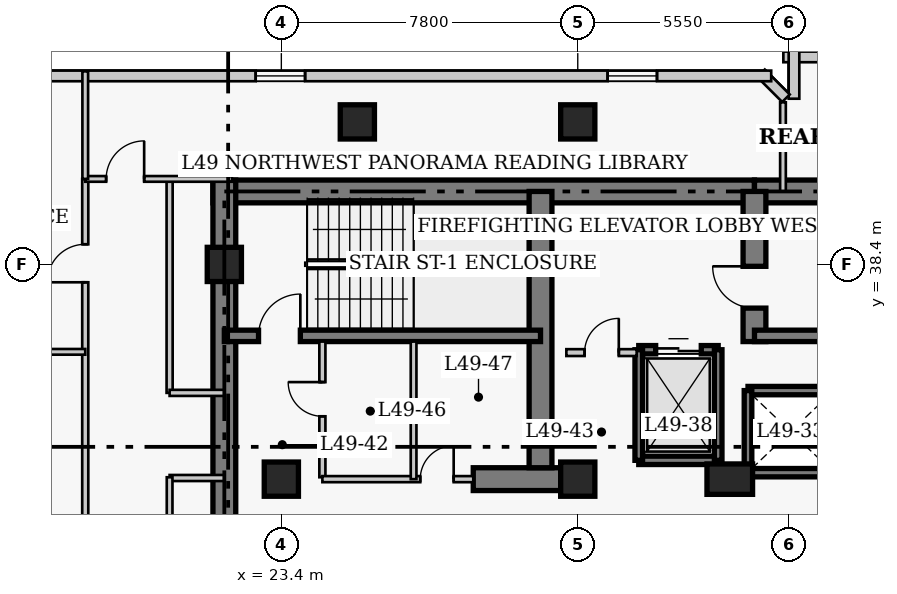
"""IFC4 building model, lengths in metres.
Left out: names, types, materials, properties, quantities, classifications, styles, units other than length and angle.
Written with IfcOpenShell. Run it as: python <this file> out.ifc"""

import sys

from ifc_helpers import new_model, si_unit, direction, frame, frame_2d, origin, origin_2d, place, context, subcontext, project, spatial, rectangle, extrude, element, fill, save


model = new_model("IFC4")
c1 = context("Model", 3, precision=1e-05, world=origin(), true_north=direction((0.0, 1.0)))
c2 = subcontext(c1, "Body", "Model", "MODEL_VIEW")
j1 = project(units=[si_unit("LENGTHUNIT", "METRE"), si_unit("PLANEANGLEUNIT", "RADIAN")], contexts=[c1])
p1 = place(None, origin())
s1 = spatial("IfcSite", under=j1, at=p1, CompositionType="ELEMENT")
p2 = place(p1, origin())
s2 = spatial("IfcBuilding", under=s1, at=p2, CompositionType="ELEMENT")
p3 = place(p2, frame((0.0, 0.0, 196.8)))
s3 = spatial("IfcBuildingStorey", under=s2, at=p3, CompositionType="ELEMENT", Elevation=196.8)
p4 = place(p3, frame((21.6, 40.32, 0.0), z_axis=(0.0, 0.0, 1.0), x_axis=(1.0, 0.0, 0.0)))
e1 = element("IfcWall", 1, at=p4, inside=s3, PredefinedType="SHEAR", context=c2, shape_type="SweptSolid", body=[
    extrude(rectangle(XDim=14.25, YDim=0.6, at=frame_2d((7.125, 0.0))), origin(), (0.0, 0.0, 1.0), 3.9),
])
p5 = place(p3, frame((35.85, 40.32, 0.0), z_axis=(0.0, 0.0, 1.0), x_axis=(1.0, 0.0, 0.0)))
e2 = element("IfcWall", 2, at=p5, inside=s3, PredefinedType="SHEAR", context=c2, shape_type="SweptSolid", body=[
    extrude(rectangle(XDim=12.6, YDim=0.6, at=frame_2d((6.3, 0.0))), origin(), (0.0, 0.0, 1.0), 3.9),
])
p6 = place(p3, frame((21.9, 27.05, 0.0), z_axis=(0.0, 0.0, 1.0), x_axis=(0.0, 1.0, 0.0)))
e3 = element("IfcWall", 3, at=p6, inside=s3, PredefinedType="SHEAR", context=c2, shape_type="SweptSolid", body=[
    extrude(rectangle(XDim=13.57, YDim=0.6, at=frame_2d((6.785, 0.0))), origin(), (0.0, 0.0, 1.0), 3.9),
])
p7 = place(p3, frame((28.45, 32.75, 0.0), z_axis=(0.0, 0.0, 1.0), x_axis=(1.0, 0.0, 0.0)))
e4 = element("IfcWall", 4, at=p7, inside=s3, PredefinedType="SHEAR", context=c2, shape_type="SweptSolid", body=[
    extrude(rectangle(XDim=2.4, YDim=0.6, at=frame_2d((1.2, 0.0))), origin(), (0.0, 0.0, 1.0), 3.9),
])
p8 = place(p3, frame((30.22, 33.05, 0.0), z_axis=(0.0, 0.0, 1.0), x_axis=(0.0, 1.0, 0.0)))
e5 = element("IfcWall", 5, at=p8, inside=s3, PredefinedType="SHEAR", context=c2, shape_type="SweptSolid", body=[
    extrude(rectangle(XDim=7.27, YDim=0.6, at=frame_2d((3.635, 0.0))), origin(), (0.0, 0.0, 1.0), 3.9),
])
p9 = place(p3, frame((35.85, 36.37, 0.0), z_axis=(0.0, 0.0, 1.0), x_axis=(0.0, 1.0, 0.0)))
e6 = element("IfcWall", 6, at=p9, inside=s3, PredefinedType="SHEAR", context=c2, shape_type="SweptSolid", body=[
    extrude(rectangle(XDim=3.95, YDim=0.6, at=frame_2d((1.975, 0.0))), origin(), (0.0, 0.0, 1.0), 3.9),
])
p10 = place(p9, frame((0.88, 0.0, 0.0)))
e7 = element("IfcOpeningElement", 7, at=p10, cuts=e6, PredefinedType="OPENING", context=c2, shape_type="SweptSolid", body=[
    extrude(rectangle(XDim=1.1, YDim=2.15, at=frame_2d((0.55, 1.075))), frame((0.0, 0.31, 0.0), z_axis=(0.0, -1.0, 0.0), x_axis=(1.0, 0.0, 0.0)), (0.0, 0.0, 1.0), 0.62),
])
p11 = place(p3, frame((21.9, 36.52, 0.0), z_axis=(0.0, 0.0, 1.0), x_axis=(1.0, 0.0, 0.0)))
e8 = element("IfcWall", 8, at=p11, inside=s3, PredefinedType="SHEAR", context=c2, shape_type="SweptSolid", body=[
    extrude(rectangle(XDim=8.32, YDim=0.3, at=frame_2d((4.16, 0.0))), origin(), (0.0, 0.0, 1.0), 3.9),
])
p12 = place(p11, frame((0.9, 0.0, 0.0)))
e9 = element("IfcOpeningElement", 9, at=p12, cuts=e8, PredefinedType="OPENING", context=c2, shape_type="SweptSolid", body=[
    extrude(rectangle(XDim=1.1, YDim=2.15, at=frame_2d((0.55, 1.075))), frame((0.0, 0.16, 0.0), z_axis=(0.0, -1.0, 0.0), x_axis=(1.0, 0.0, 0.0)), (0.0, 0.0, 1.0), 0.32),
])
p13 = place(p3, frame((35.85, 36.52, 0.0), z_axis=(0.0, 0.0, 1.0), x_axis=(1.0, 0.0, 0.0)))
e10 = element("IfcWall", 10, at=p13, inside=s3, PredefinedType="SHEAR", context=c2, shape_type="SweptSolid", body=[
    extrude(rectangle(XDim=8.33, YDim=0.3, at=frame_2d((4.165, 0.0))), origin(), (0.0, 0.0, 1.0), 3.9),
])
for number, where, z_axis, x_axis in (
    (11, (21.9, 38.4, 0.0), (0.0, 0.0, 1.0), (1.0, 0.0, 0.0)),
    (12, (23.4, 32.75, 0.0), (0.0, 0.0, 1.0), (1.0, 0.0, 0.0)),
    (13, (31.2, 32.75, 0.0), (0.0, 0.0, 1.0), (1.0, 0.0, 0.0)),
):
    element("IfcColumn", number, at=place(p3, frame(where, z_axis=z_axis, x_axis=x_axis)), inside=s3, PredefinedType="COLUMN", context=c2, shape_type="SweptSolid", body=[
        extrude(rectangle(XDim=0.9, YDim=0.9, at=origin_2d()), origin(), (0.0, 0.0, 1.0), 3.9),
    ])
p14 = place(p3, frame((35.2, 32.75, 0.0), z_axis=(0.0, 0.0, 1.0), x_axis=(1.0, 0.0, 0.0)))
e14 = element("IfcColumn", 14, at=p14, inside=s3, PredefinedType="COLUMN", context=c2, shape_type="SweptSolid", body=[
    extrude(rectangle(XDim=1.2, YDim=0.8, at=origin_2d()), origin(), (0.0, 0.0, 1.0), 3.9),
])
for number, where, z_axis, x_axis in (
    (15, (25.4, 42.15, 0.0), (0.0, 0.0, 1.0), (1.0, 0.0, 0.0)),
    (16, (31.2, 42.15, 0.0), (0.0, 0.0, 1.0), (1.0, 0.0, 0.0)),
):
    element("IfcColumn", number, at=place(p3, frame(where, z_axis=z_axis, x_axis=x_axis)), inside=s3, PredefinedType="COLUMN", context=c2, shape_type="SweptSolid", body=[
        extrude(rectangle(XDim=0.9, YDim=0.9, at=origin_2d()), origin(), (0.0, 0.0, 1.0), 3.9),
    ])
p15 = place(p3, frame((41.39, 43.86, 0.0), z_axis=(0.0, 0.0, 1.0), x_axis=(-1.0, 0.0, 0.0)))
e17 = element("IfcWall", 17, at=p15, inside=s3, PredefinedType="SOLIDWALL", context=c2, shape_type="SweptSolid", body=[
    extrude(rectangle(XDim=4.78, YDim=0.28, at=frame_2d((2.39, 0.0))), origin(), (0.0, 0.0, 1.0), 3.65),
])
p16 = place(p15, frame((1.74, 0.0, 0.85)))
e18 = element("IfcOpeningElement", 18, at=p16, cuts=e17, PredefinedType="OPENING", context=c2, shape_type="SweptSolid", body=[
    extrude(rectangle(XDim=1.3, YDim=1.7, at=frame_2d((0.65, 0.85))), frame((0.0, 0.15, 0.0), z_axis=(0.0, -1.0, 0.0), x_axis=(1.0, 0.0, 0.0)), (0.0, 0.0, 1.0), 0.3),
])
p17 = place(p3, frame((36.89, 44.14, 0.0), z_axis=(0.0, 0.0, 1.0), x_axis=(0.0, -1.0, 0.0)))
e19 = element("IfcWall", 19, at=p17, inside=s3, PredefinedType="SOLIDWALL", context=c2, shape_type="SweptSolid", body=[
    extrude(rectangle(XDim=1.38, YDim=0.28, at=frame_2d((0.69, 0.0))), origin(), (0.0, 0.0, 1.0), 3.65),
])
p18 = place(p3, frame((36.679, 42.773, 0.0), z_axis=(0.0, 0.0, 1.0), x_axis=(-0.707106781187, 0.707106781187, 0.0)))
e20 = element("IfcWall", 20, at=p18, inside=s3, PredefinedType="SOLIDWALL", context=c2, shape_type="SweptSolid", body=[
    extrude(rectangle(XDim=0.928, YDim=0.28, at=frame_2d((0.464, 0.0))), origin(), (0.0, 0.0, 1.0), 3.65),
])
p19 = place(p3, frame((36.29, 43.36, 0.0), z_axis=(0.0, 0.0, 1.0), x_axis=(-1.0, 0.0, 0.0)))
e21 = element("IfcWall", 21, at=p19, inside=s3, PredefinedType="SOLIDWALL", context=c2, shape_type="SweptSolid", body=[
    extrude(rectangle(XDim=25.83, YDim=0.28, at=frame_2d((12.915, 0.0))), origin(), (0.0, 0.0, 1.0), 3.65),
])
p20 = place(p19, frame((3.005, 0.0, 0.85)))
e22 = element("IfcOpeningElement", 22, at=p20, cuts=e21, PredefinedType="OPENING", context=c2, shape_type="SweptSolid", body=[
    extrude(rectangle(XDim=1.3, YDim=1.7, at=frame_2d((0.65, 0.85))), frame((0.0, 0.15, 0.0), z_axis=(0.0, -1.0, 0.0), x_axis=(1.0, 0.0, 0.0)), (0.0, 0.0, 1.0), 0.3),
])
p21 = place(p19, frame((12.265, 0.0, 0.85)))
e23 = element("IfcOpeningElement", 23, at=p21, cuts=e21, PredefinedType="OPENING", context=c2, shape_type="SweptSolid", body=[
    extrude(rectangle(XDim=1.3, YDim=1.7, at=frame_2d((0.65, 0.85))), frame((0.0, 0.15, 0.0), z_axis=(0.0, -1.0, 0.0), x_axis=(1.0, 0.0, 0.0)), (0.0, 0.0, 1.0), 0.3),
])
p22 = place(p19, frame((20.875, 0.0, 0.85)))
e24 = element("IfcOpeningElement", 24, at=p22, cuts=e21, PredefinedType="OPENING", context=c2, shape_type="SweptSolid", body=[
    extrude(rectangle(XDim=1.3, YDim=1.7, at=frame_2d((0.65, 0.85))), frame((0.0, 0.15, 0.0), z_axis=(0.0, -1.0, 0.0), x_axis=(1.0, 0.0, 0.0)), (0.0, 0.0, 1.0), 0.3),
])
for number, where, z_axis, x_axis in (
    (25, (35.68, 35.08, 0.0), (0.0, 0.0, 1.0), (1.0, 0.0, 0.0)),
    (26, (35.68, 32.92, 0.0), (0.0, 0.0, 1.0), (1.0, 0.0, 0.0)),
):
    element("IfcWall", number, at=place(p3, frame(where, z_axis=z_axis, x_axis=x_axis)), inside=s3, PredefinedType="SHEAR", context=c2, shape_type="SweptSolid", body=[
        extrude(rectangle(XDim=2.32, YDim=0.22, at=frame_2d((1.16, 0.0))), origin(), (0.0, 0.0, 1.0), 3.9),
    ])
p23 = place(p3, frame((35.68, 32.92, 0.0), z_axis=(0.0, 0.0, 1.0), x_axis=(0.0, 1.0, 0.0)))
e27 = element("IfcWall", 27, at=p23, inside=s3, PredefinedType="SHEAR", context=c2, shape_type="SweptSolid", body=[
    extrude(rectangle(XDim=2.16, YDim=0.2, at=frame_2d((1.08, 0.0))), origin(), (0.0, 0.0, 1.0), 3.9),
])
p24 = place(p3, frame((32.805, 36.155, 0.0), z_axis=(0.0, 0.0, 1.0), x_axis=(1.0, 0.0, 0.0)))
e28 = element("IfcWall", 28, at=p24, inside=s3, PredefinedType="SHEAR", context=c2, shape_type="SweptSolid", body=[
    extrude(rectangle(XDim=2.09, YDim=0.22, at=frame_2d((1.045, 0.0))), origin(), (0.0, 0.0, 1.0), 3.9),
])
p25 = place(p24, frame((0.445, 0.0, 0.0)))
e29 = element("IfcOpeningElement", 29, at=p25, cuts=e28, PredefinedType="OPENING", context=c2, shape_type="SweptSolid", body=[
    extrude(rectangle(XDim=1.2, YDim=2.15, at=frame_2d((0.6, 1.075))), frame((0.0, 0.12, 0.0), z_axis=(0.0, -1.0, 0.0), x_axis=(1.0, 0.0, 0.0)), (0.0, 0.0, 1.0), 0.24),
])
p26 = place(p3, frame((32.805, 33.245, 0.0), z_axis=(0.0, 0.0, 1.0), x_axis=(1.0, 0.0, 0.0)))
e30 = element("IfcWall", 30, at=p26, inside=s3, PredefinedType="SHEAR", context=c2, shape_type="SweptSolid", body=[
    extrude(rectangle(XDim=2.09, YDim=0.22, at=frame_2d((1.045, 0.0))), origin(), (0.0, 0.0, 1.0), 3.9),
])
for number, where, z_axis, x_axis in (
    (31, (32.805, 33.245, 0.0), (0.0, 0.0, 1.0), (0.0, 1.0, 0.0)),
    (32, (34.895, 33.245, 0.0), (0.0, 0.0, 1.0), (0.0, 1.0, 0.0)),
):
    element("IfcWall", number, at=place(p3, frame(where, z_axis=z_axis, x_axis=x_axis)), inside=s3, PredefinedType="SHEAR", context=c2, shape_type="SweptSolid", body=[
        extrude(rectangle(XDim=2.91, YDim=0.2, at=frame_2d((1.455, 0.0))), origin(), (0.0, 0.0, 1.0), 3.9),
    ])
p27 = place(p3, frame((30.9, 36.08, 0.0), z_axis=(0.0, 0.0, 1.0), x_axis=(1.0, 0.0, 0.0)))
e33 = element("IfcWall", 33, at=p27, inside=s3, PredefinedType="PARTITIONING", context=c2, shape_type="SweptSolid", body=[
    extrude(rectangle(XDim=1.85, YDim=0.18, at=frame_2d((0.925, 0.0))), origin(), (0.0, 0.0, 1.0), 3.65),
])
p28 = place(p27, frame((0.48, 0.0, 0.0)))
e34 = element("IfcOpeningElement", 34, at=p28, cuts=e33, PredefinedType="OPENING", context=c2, shape_type="SweptSolid", body=[
    extrude(rectangle(XDim=0.9, YDim=2.15, at=frame_2d((0.45, 1.075))), frame((0.0, 0.1, 0.0), z_axis=(0.0, -1.0, 0.0), x_axis=(1.0, 0.0, 0.0)), (0.0, 0.0, 1.0), 0.2),
])
p29 = place(p3, frame((24.48, 32.8, 0.0), z_axis=(0.0, 0.0, 1.0), x_axis=(0.0, 1.0, 0.0)))
e35 = element("IfcWall", 35, at=p29, inside=s3, PredefinedType="PARTITIONING", context=c2, shape_type="SweptSolid", body=[
    extrude(rectangle(XDim=3.57, YDim=0.16, at=frame_2d((1.785, 0.0))), origin(), (0.0, 0.0, 1.0), 3.65),
])
p30 = place(p29, frame((1.604, 0.0, 0.0)))
e36 = element("IfcOpeningElement", 36, at=p30, cuts=e35, PredefinedType="OPENING", context=c2, shape_type="SweptSolid", body=[
    extrude(rectangle(XDim=0.9, YDim=2.1, at=frame_2d((0.45, 1.05))), frame((0.0, 0.09, 0.0), z_axis=(0.0, -1.0, 0.0), x_axis=(1.0, 0.0, 0.0)), (0.0, 0.0, 1.0), 0.18),
])
p31 = place(p3, frame((24.48, 32.75, 0.0), z_axis=(0.0, 0.0, 1.0), x_axis=(1.0, 0.0, 0.0)))
e37 = element("IfcWall", 37, at=p31, inside=s3, PredefinedType="PARTITIONING", context=c2, shape_type="SweptSolid", body=[
    extrude(rectangle(XDim=3.97, YDim=0.16, at=frame_2d((1.985, 0.0))), origin(), (0.0, 0.0, 1.0), 3.65),
])
p32 = place(p31, frame((2.575, 0.0, 0.0)))
e38 = element("IfcOpeningElement", 38, at=p32, cuts=e37, PredefinedType="OPENING", context=c2, shape_type="SweptSolid", body=[
    extrude(rectangle(XDim=0.88, YDim=2.05, at=frame_2d((0.44, 1.025))), frame((0.0, 0.09, 0.0), z_axis=(0.0, -1.0, 0.0), x_axis=(1.0, 0.0, 0.0)), (0.0, 0.0, 1.0), 0.18),
])
p33 = place(p3, frame((26.88, 32.75, 0.0), z_axis=(0.0, 0.0, 1.0), x_axis=(0.0, 1.0, 0.0)))
e39 = element("IfcWall", 39, at=p33, inside=s3, PredefinedType="PARTITIONING", context=c2, shape_type="SweptSolid", body=[
    extrude(rectangle(XDim=3.62, YDim=0.15, at=frame_2d((1.81, 0.0))), origin(), (0.0, 0.0, 1.0), 3.65),
])
p34 = place(p3, frame((18.24, 7.55, 0.0), z_axis=(0.0, 0.0, 1.0), x_axis=(0.0, 1.0, 0.0)))
e40 = element("IfcWall", 40, at=p34, inside=s3, PredefinedType="PARTITIONING", context=c2, shape_type="SweptSolid", body=[
    extrude(rectangle(XDim=33.1, YDim=0.16, at=frame_2d((16.55, 0.0))), origin(), (0.0, 0.0, 1.0), 3.65),
])
p35 = place(p34, frame((1.35, 0.0, 0.0)))
e41 = element("IfcOpeningElement", 41, at=p35, cuts=e40, PredefinedType="OPENING", context=c2, shape_type="SweptSolid", body=[
    extrude(rectangle(XDim=0.95, YDim=2.1, at=frame_2d((0.475, 1.05))), frame((0.0, 0.09, 0.0), z_axis=(0.0, -1.0, 0.0), x_axis=(1.0, 0.0, 0.0)), (0.0, 0.0, 1.0), 0.18),
])
p36 = place(p34, frame((7.575, 0.0, 0.0)))
e42 = element("IfcOpeningElement", 42, at=p36, cuts=e40, PredefinedType="OPENING", context=c2, shape_type="SweptSolid", body=[
    extrude(rectangle(XDim=0.95, YDim=2.1, at=frame_2d((0.475, 1.05))), frame((0.0, 0.09, 0.0), z_axis=(0.0, -1.0, 0.0), x_axis=(1.0, 0.0, 0.0)), (0.0, 0.0, 1.0), 0.18),
])
p37 = place(p34, frame((20.025, 0.0, 0.0)))
e43 = element("IfcOpeningElement", 43, at=p37, cuts=e40, PredefinedType="OPENING", context=c2, shape_type="SweptSolid", body=[
    extrude(rectangle(XDim=0.95, YDim=2.1, at=frame_2d((0.475, 1.05))), frame((0.0, 0.09, 0.0), z_axis=(0.0, -1.0, 0.0), x_axis=(1.0, 0.0, 0.0)), (0.0, 0.0, 1.0), 0.18),
])
p38 = place(p34, frame((30.38, 0.0, 0.0)))
e44 = element("IfcOpeningElement", 44, at=p38, cuts=e40, PredefinedType="OPENING", context=c2, shape_type="SweptSolid", body=[
    extrude(rectangle(XDim=1.0, YDim=2.15, at=frame_2d((0.5, 1.075))), frame((0.0, 0.09, 0.0), z_axis=(0.0, -1.0, 0.0), x_axis=(1.0, 0.0, 0.0)), (0.0, 0.0, 1.0), 0.18),
])
p39 = place(p3, frame((20.46, 35.02, 0.0), z_axis=(0.0, 0.0, 1.0), x_axis=(0.0, 1.0, 0.0)))
e45 = element("IfcWall", 45, at=p39, inside=s3, PredefinedType="PARTITIONING", context=c2, shape_type="SweptSolid", body=[
    extrude(rectangle(XDim=5.63, YDim=0.16, at=frame_2d((2.815, 0.0))), origin(), (0.0, 0.0, 1.0), 3.65),
])
for number, where, z_axis, x_axis in (
    (46, (20.46, 35.02, 0.0), (0.0, 0.0, 1.0), (1.0, 0.0, 0.0)),
    (47, (20.46, 32.78, 0.0), (0.0, 0.0, 1.0), (1.0, 0.0, 0.0)),
):
    element("IfcWall", number, at=place(p3, frame(where, z_axis=z_axis, x_axis=x_axis)), inside=s3, PredefinedType="PARTITIONING", context=c2, shape_type="SweptSolid", body=[
        extrude(rectangle(XDim=1.44, YDim=0.16, at=frame_2d((0.72, 0.0))), origin(), (0.0, 0.0, 1.0), 3.65),
    ])
p40 = place(p3, frame((18.24, 40.65, 0.0), z_axis=(0.0, 0.0, 1.0), x_axis=(1.0, 0.0, 0.0)))
e48 = element("IfcWall", 48, at=p40, inside=s3, PredefinedType="PARTITIONING", context=c2, shape_type="SweptSolid", body=[
    extrude(rectangle(XDim=3.86, YDim=0.15, at=frame_2d((1.93, 0.0))), origin(), (0.0, 0.0, 1.0), 3.65),
])
p41 = place(p40, frame((0.55, 0.0, 0.0)))
e49 = element("IfcOpeningElement", 49, at=p41, cuts=e48, PredefinedType="OPENING", context=c2, shape_type="SweptSolid", body=[
    extrude(rectangle(XDim=1.0, YDim=2.15, at=frame_2d((0.5, 1.075))), frame((0.0, 0.085, 0.0), z_axis=(0.0, -1.0, 0.0), x_axis=(1.0, 0.0, 0.0)), (0.0, 0.0, 1.0), 0.17),
])
p42 = place(p3, frame((20.46, 17.26, 0.0), z_axis=(0.0, 0.0, 1.0), x_axis=(0.0, 1.0, 0.0)))
e50 = element("IfcWall", 50, at=p42, inside=s3, PredefinedType="PARTITIONING", context=c2, shape_type="SweptSolid", body=[
    extrude(rectangle(XDim=15.54, YDim=0.15, at=frame_2d((7.77, 0.0))), origin(), (0.0, 0.0, 1.0), 3.65),
])
p43 = place(p3, frame((18.24, 40.65, 0.0), z_axis=(0.0, 0.0, 1.0), x_axis=(0.0, 1.0, 0.0)))
e51 = element("IfcWall", 51, at=p43, inside=s3, PredefinedType="PARTITIONING", context=c2, shape_type="SweptSolid", body=[
    extrude(rectangle(XDim=2.83, YDim=0.15, at=frame_2d((1.415, 0.0))), origin(), (0.0, 0.0, 1.0), 3.65),
])
p44 = place(p3, frame((36.6, 40.32, 0.0), z_axis=(0.0, 0.0, 1.0), x_axis=(0.0, 1.0, 0.0)))
e52 = element("IfcWall", 52, at=p44, inside=s3, PredefinedType="PARTITIONING", context=c2, shape_type="SweptSolid", body=[
    extrude(rectangle(XDim=2.345, YDim=0.15, at=frame_2d((1.172, 0.0))), origin(), (0.0, 0.0, 1.0), 3.65),
])
p45 = place(p3, frame((14.45, 36.1, 0.0), z_axis=(0.0, 0.0, 1.0), x_axis=(1.0, 0.0, 0.0)))
e53 = element("IfcWall", 53, at=p45, inside=s3, PredefinedType="PARTITIONING", context=c2, shape_type="SweptSolid", body=[
    extrude(rectangle(XDim=3.79, YDim=0.15, at=frame_2d((1.895, 0.0))), origin(), (0.0, 0.0, 1.0), 3.65),
])
p46 = place(p20, origin())
e54 = element("IfcWindow", 54, at=p46, inside=s3, PartitioningType="SINGLE_PANEL", PredefinedType="WINDOW", context=c2, shape_type="SweptSolid", body=[
    extrude(rectangle(XDim=1.3, YDim=1.7, at=frame_2d((0.65, 0.85))), frame((0.0, 0.03, 0.0), z_axis=(0.0, -1.0, 0.0), x_axis=(1.0, 0.0, 0.0)), (0.0, 0.0, 1.0), 0.06),
])
fill(e22, e54)
p47 = place(p21, origin())
e55 = element("IfcWindow", 55, at=p47, inside=s3, PartitioningType="SINGLE_PANEL", PredefinedType="WINDOW", context=c2, shape_type="SweptSolid", body=[
    extrude(rectangle(XDim=1.3, YDim=1.7, at=frame_2d((0.65, 0.85))), frame((0.0, 0.03, 0.0), z_axis=(0.0, -1.0, 0.0), x_axis=(1.0, 0.0, 0.0)), (0.0, 0.0, 1.0), 0.06),
])
fill(e23, e55)
p48 = place(p25, origin())
e56 = element("IfcDoor", 56, at=p48, inside=s3, OperationType="DOUBLE_DOOR_SLIDING", PredefinedType="DOOR", context=c2, shape_type="SweptSolid", body=[
    extrude(rectangle(XDim=1.2, YDim=2.15, at=frame_2d((0.6, 1.075))), frame((0.0, 0.025, 0.0), z_axis=(0.0, -1.0, 0.0), x_axis=(1.0, 0.0, 0.0)), (0.0, 0.0, 1.0), 0.05),
])
fill(e29, e56)
p49 = place(p28, origin())
e57 = element("IfcDoor", 57, at=p49, inside=s3, OperationType="SINGLE_SWING_RIGHT", PredefinedType="DOOR", context=c2, shape_type="SweptSolid", body=[
    extrude(rectangle(XDim=0.9, YDim=2.15, at=frame_2d((0.45, 1.075))), frame((0.0, 0.025, 0.0), z_axis=(0.0, -1.0, 0.0), x_axis=(1.0, 0.0, 0.0)), (0.0, 0.0, 1.0), 0.05),
])
fill(e34, e57)
p50 = place(p30, origin())
e58 = element("IfcDoor", 58, at=p50, inside=s3, OperationType="SINGLE_SWING_RIGHT", PredefinedType="DOOR", context=c2, shape_type="SweptSolid", body=[
    extrude(rectangle(XDim=0.9, YDim=2.1, at=frame_2d((0.45, 1.05))), frame((0.0, 0.025, 0.0), z_axis=(0.0, -1.0, 0.0), x_axis=(1.0, 0.0, 0.0)), (0.0, 0.0, 1.0), 0.05),
])
fill(e36, e58)
p51 = place(p32, origin())
e59 = element("IfcDoor", 59, at=p51, inside=s3, OperationType="SINGLE_SWING_RIGHT", PredefinedType="DOOR", context=c2, shape_type="SweptSolid", body=[
    extrude(rectangle(XDim=0.88, YDim=2.05, at=frame_2d((0.44, 1.025))), frame((0.0, 0.025, 0.0), z_axis=(0.0, -1.0, 0.0), x_axis=(1.0, 0.0, 0.0)), (0.0, 0.0, 1.0), 0.05),
])
fill(e38, e59)
p52 = place(p41, origin())
e60 = element("IfcDoor", 60, at=p52, inside=s3, OperationType="SINGLE_SWING_RIGHT", PredefinedType="DOOR", context=c2, shape_type="SweptSolid", body=[
    extrude(rectangle(XDim=1.0, YDim=2.15, at=frame_2d((0.5, 1.075))), frame((0.0, 0.025, 0.0), z_axis=(0.0, -1.0, 0.0), x_axis=(1.0, 0.0, 0.0)), (0.0, 0.0, 1.0), 0.05),
])
fill(e49, e60)
p53 = place(p38, origin())
e61 = element("IfcDoor", 61, at=p53, inside=s3, OperationType="SINGLE_SWING_LEFT", PredefinedType="DOOR", context=c2, shape_type="SweptSolid", body=[
    extrude(rectangle(XDim=1.0, YDim=2.15, at=frame_2d((0.5, 1.075))), frame((0.0, 0.025, 0.0), z_axis=(0.0, -1.0, 0.0), x_axis=(1.0, 0.0, 0.0)), (0.0, 0.0, 1.0), 0.05),
])
fill(e44, e61)
p54 = place(p12, origin())
e62 = element("IfcDoor", 62, at=p54, inside=s3, OperationType="SINGLE_SWING_RIGHT", PredefinedType="DOOR", context=c2, shape_type="SweptSolid", body=[
    extrude(rectangle(XDim=1.1, YDim=2.15, at=frame_2d((0.55, 1.075))), frame((0.0, 0.025, 0.0), z_axis=(0.0, -1.0, 0.0), x_axis=(1.0, 0.0, 0.0)), (0.0, 0.0, 1.0), 0.05),
])
fill(e9, e62)
p55 = place(p10, origin())
e63 = element("IfcDoor", 63, at=p55, inside=s3, OperationType="SINGLE_SWING_RIGHT", PredefinedType="DOOR", context=c2, shape_type="SweptSolid", body=[
    extrude(rectangle(XDim=1.1, YDim=2.15, at=frame_2d((0.55, 1.075))), frame((0.0, 0.025, 0.0), z_axis=(0.0, -1.0, 0.0), x_axis=(1.0, 0.0, 0.0)), (0.0, 0.0, 1.0), 0.05),
])
fill(e7, e63)
save(model, sys.argv[1])
